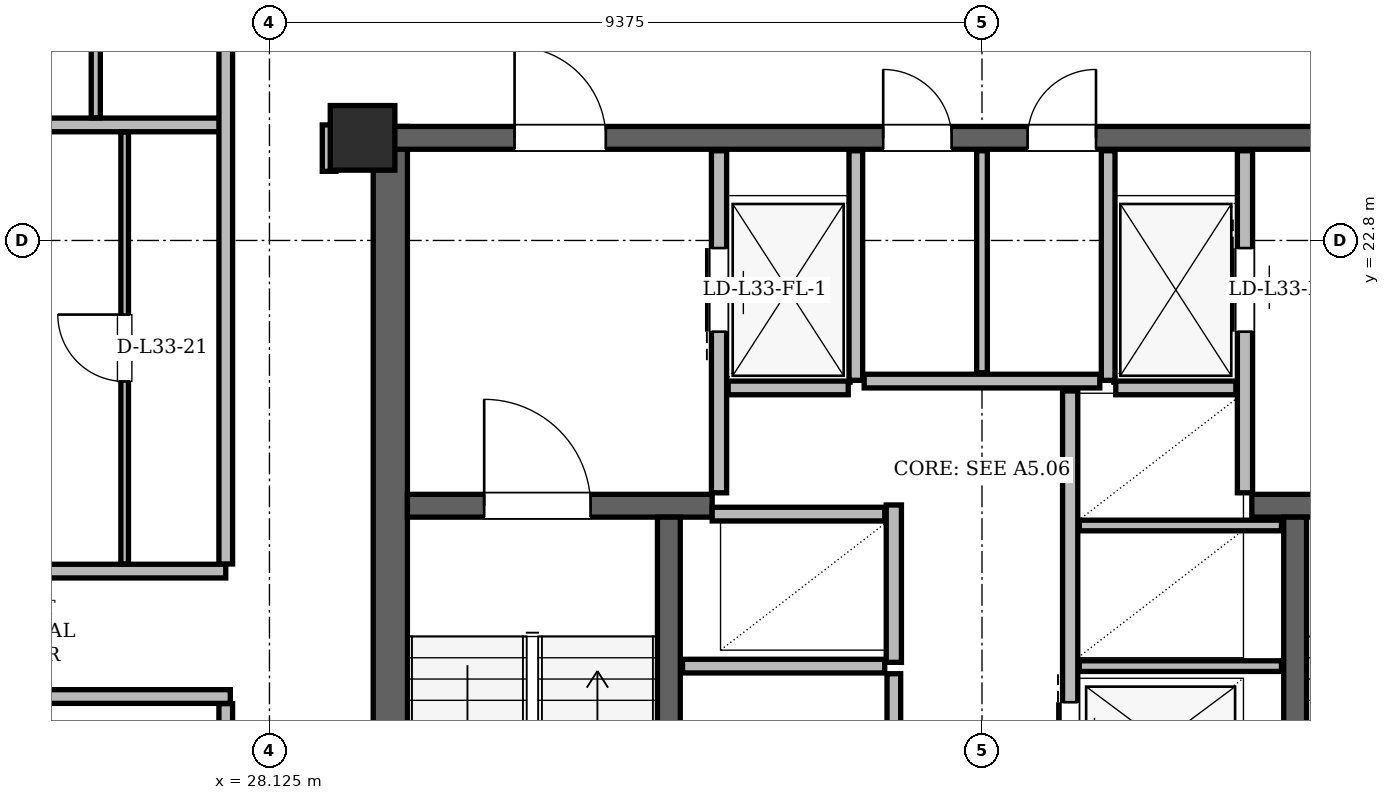
"""IFC4 building model, lengths in metres.
Left out: names, types, materials, properties, quantities, classifications, styles, units other than length and angle.
Written with IfcOpenShell. Run it as: python <this file> out.ifc"""

import sys

from ifc_helpers import new_model, si_unit, direction, frame, frame_2d, origin, origin_2d, place, context, subcontext, project, spatial, rectangle, hollow_rectangle, extrude, element, fill, save


model = new_model("IFC4")
c1 = context("Model", 3, precision=1e-05, world=origin(), true_north=direction((0.0, 1.0)))
c2 = subcontext(c1, "Body", "Model", "MODEL_VIEW")
j1 = project(units=[si_unit("LENGTHUNIT", "METRE"), si_unit("PLANEANGLEUNIT", "RADIAN")], contexts=[c1])
p1 = place(None, origin())
s1 = spatial("IfcSite", under=j1, at=p1, CompositionType="ELEMENT")
p2 = place(p1, origin())
s2 = spatial("IfcBuilding", under=s1, at=p2, CompositionType="ELEMENT")
p3 = place(p2, frame((0.0, 0.0, 126.6)))
s3 = spatial("IfcBuildingStorey", under=s2, at=p3, CompositionType="ELEMENT", Elevation=126.6)
p4 = place(p3, frame((29.35, 24.15, 0.0), z_axis=(0.0, 0.0, 1.0), x_axis=(1.0, 0.0, 0.0)))
e1 = element("IfcColumn", 1, at=p4, inside=s3, PredefinedType="COLUMN", context=c2, shape_type="SweptSolid", body=[
    extrude(hollow_rectangle(XDim=0.85, YDim=0.85, WallThickness=0.07, at=origin_2d()), origin(), (0.0, 0.0, 1.0), 3.6),
])
p5 = place(p3, frame((29.715, 11.0, 0.0), z_axis=(0.0, 0.0, 1.0), x_axis=(0.0, 1.0, 0.0)))
e2 = element("IfcWall", 2, at=p5, inside=s3, PredefinedType="SHEAR", context=c2, shape_type="SweptSolid", body=[
    extrude(rectangle(XDim=13.3, YDim=0.45, at=frame_2d((6.65, 0.0))), origin(), (0.0, 0.0, 1.0), 3.36),
])
p6 = place(p3, frame((29.65, 24.15, 0.0), z_axis=(0.0, 0.0, 1.0), x_axis=(1.0, 0.0, 0.0)))
e3 = element("IfcWall", 3, at=p6, inside=s3, PredefinedType="SHEAR", context=c2, shape_type="SweptSolid", body=[
    extrude(rectangle(XDim=15.7, YDim=0.3, at=frame_2d((7.85, 0.0))), origin(), (0.0, 0.0, 1.0), 3.36),
])
p7 = place(p6, frame((1.7, 0.0, 0.0)))
e4 = element("IfcOpeningElement", 4, at=p7, cuts=e3, PredefinedType="OPENING", context=c2, shape_type="SweptSolid", body=[
    extrude(rectangle(XDim=1.2, YDim=2.2, at=frame_2d((0.6, 1.1))), frame((0.0, 0.15, 0.0), z_axis=(0.0, -1.0, 0.0), x_axis=(1.0, 0.0, 0.0)), (0.0, 0.0, 1.0), 0.3),
])
p8 = place(p6, frame((12.8, 0.0, 0.0)))
e5 = element("IfcOpeningElement", 5, at=p8, cuts=e3, PredefinedType="OPENING", context=c2, shape_type="SweptSolid", body=[
    extrude(rectangle(XDim=1.2, YDim=2.2, at=frame_2d((0.6, 1.1))), frame((0.0, 0.15, 0.0), z_axis=(0.0, -1.0, 0.0), x_axis=(1.0, 0.0, 0.0)), (0.0, 0.0, 1.0), 0.3),
])
p9 = place(p6, frame((6.55, 0.0, 0.0)))
e6 = element("IfcOpeningElement", 6, at=p9, cuts=e3, PredefinedType="OPENING", context=c2, shape_type="SweptSolid", body=[
    extrude(rectangle(XDim=0.9, YDim=2.05, at=frame_2d((0.45, 1.025))), frame((0.0, 0.15, 0.0), z_axis=(0.0, -1.0, 0.0), x_axis=(1.0, 0.0, 0.0)), (0.0, 0.0, 1.0), 0.3),
])
p10 = place(p6, frame((8.45, 0.0, 0.0)))
e7 = element("IfcOpeningElement", 7, at=p10, cuts=e3, PredefinedType="OPENING", context=c2, shape_type="SweptSolid", body=[
    extrude(rectangle(XDim=0.9, YDim=2.05, at=frame_2d((0.45, 1.025))), frame((0.0, 0.15, 0.0), z_axis=(0.0, -1.0, 0.0), x_axis=(1.0, 0.0, 0.0)), (0.0, 0.0, 1.0), 0.3),
])
p11 = place(p3, frame((29.94, 19.31, 0.0), z_axis=(0.0, 0.0, 1.0), x_axis=(1.0, 0.0, 0.0)))
e8 = element("IfcWall", 8, at=p11, inside=s3, PredefinedType="SHEAR", context=c2, shape_type="SweptSolid", body=[
    extrude(rectangle(XDim=4.01, YDim=0.3, at=frame_2d((2.005, 0.0))), origin(), (0.0, 0.0, 1.0), 3.36),
])
p12 = place(p11, frame((1.01, 0.0, 0.0)))
e9 = element("IfcOpeningElement", 9, at=p12, cuts=e8, PredefinedType="OPENING", context=c2, shape_type="SweptSolid", body=[
    extrude(rectangle(XDim=1.4, YDim=2.2, at=frame_2d((0.7, 1.1))), frame((0.0, 0.15, 0.0), z_axis=(0.0, -1.0, 0.0), x_axis=(1.0, 0.0, 0.0)), (0.0, 0.0, 1.0), 0.3),
])
p13 = place(p3, frame((41.05, 19.31, 0.0), z_axis=(0.0, 0.0, 1.0), x_axis=(1.0, 0.0, 0.0)))
e10 = element("IfcWall", 10, at=p13, inside=s3, PredefinedType="SHEAR", context=c2, shape_type="SweptSolid", body=[
    extrude(rectangle(XDim=4.01, YDim=0.3, at=frame_2d((2.005, 0.0))), origin(), (0.0, 0.0, 1.0), 3.36),
])
p14 = place(p13, frame((1.6, 0.0, 0.0)))
e11 = element("IfcOpeningElement", 11, at=p14, cuts=e10, PredefinedType="OPENING", context=c2, shape_type="SweptSolid", body=[
    extrude(rectangle(XDim=1.4, YDim=2.2, at=frame_2d((0.7, 1.1))), frame((0.0, 0.15, 0.0), z_axis=(0.0, -1.0, 0.0), x_axis=(1.0, 0.0, 0.0)), (0.0, 0.0, 1.0), 0.3),
])
for number, where, z_axis, x_axis in (
    (12, (33.38, 11.54, 0.0), (0.0, 0.0, 1.0), (0.0, 1.0, 0.0)),
    (13, (41.62, 11.54, 0.0), (0.0, 0.0, 1.0), (0.0, 1.0, 0.0)),
):
    element("IfcWall", number, at=place(p3, frame(where, z_axis=z_axis, x_axis=x_axis)), inside=s3, PredefinedType="SHEAR", context=c2, shape_type="SweptSolid", body=[
        extrude(rectangle(XDim=7.62, YDim=0.3, at=frame_2d((3.81, 0.0))), origin(), (0.0, 0.0, 1.0), 3.36),
    ])
p15 = place(p3, frame((32.214, 43.387, 0.0), z_axis=(0.0, 0.0, 1.0), x_axis=(-0.499998814518, -0.866026088222, 0.0)))
e14 = element("IfcWall", 14, at=p15, inside=s3, PredefinedType="SOLIDWALL", context=c2, shape_type="SweptSolid", body=[
    extrude(rectangle(XDim=35.049, YDim=0.34, at=frame_2d((17.524, 0.0))), origin(), (0.0, 0.0, 1.0), 2.578),
])
p16 = place(p15, frame((8.034, 0.0, 0.0)))
e15 = element("IfcOpeningElement", 15, at=p16, cuts=e14, PredefinedType="OPENING", context=c2, shape_type="SweptSolid", body=[
    extrude(rectangle(XDim=1.5, YDim=2.2, at=frame_2d((0.75, 1.1))), frame((0.0, 0.17, 0.0), z_axis=(0.0, -1.0, 0.0), x_axis=(1.0, 0.0, 0.0)), (0.0, 0.0, 1.0), 0.34),
])
p17 = place(p15, frame((26.97, 0.0, 0.0)))
e16 = element("IfcOpeningElement", 16, at=p17, cuts=e14, PredefinedType="OPENING", context=c2, shape_type="SweptSolid", body=[
    extrude(rectangle(XDim=1.5, YDim=2.2, at=frame_2d((0.75, 1.1))), frame((0.0, 0.17, 0.0), z_axis=(0.0, -1.0, 0.0), x_axis=(1.0, 0.0, 0.0)), (0.0, 0.0, 1.0), 0.34),
])
p18 = place(p15, frame((32.614, 0.0, 0.85)))
e17 = element("IfcOpeningElement", 17, at=p18, cuts=e14, PredefinedType="OPENING", context=c2, shape_type="SweptSolid", body=[
    extrude(rectangle(XDim=1.4, YDim=1.6, at=frame_2d((0.7, 0.8))), frame((0.0, 0.17, 0.0), z_axis=(0.0, -1.0, 0.0), x_axis=(1.0, 0.0, 0.0)), (0.0, 0.0, 1.0), 0.34),
])
p19 = place(p15, frame((22.603, 0.0, 0.85)))
e18 = element("IfcOpeningElement", 18, at=p19, cuts=e14, PredefinedType="OPENING", context=c2, shape_type="SweptSolid", body=[
    extrude(rectangle(XDim=1.2, YDim=1.48, at=frame_2d((0.6, 0.74))), frame((0.0, 0.17, 0.0), z_axis=(0.0, -1.0, 0.0), x_axis=(1.0, 0.0, 0.0)), (0.0, 0.0, 1.0), 0.34),
])
p20 = place(p15, frame((2.414, 0.0, 0.85)))
e19 = element("IfcOpeningElement", 19, at=p20, cuts=e14, PredefinedType="OPENING", context=c2, shape_type="SweptSolid", body=[
    extrude(rectangle(XDim=1.4, YDim=1.6, at=frame_2d((0.7, 0.8))), frame((0.0, 0.17, 0.0), z_axis=(0.0, -1.0, 0.0), x_axis=(1.0, 0.0, 0.0)), (0.0, 0.0, 1.0), 0.34),
])
p21 = place(p15, frame((13.484, 0.0, 0.85)))
e20 = element("IfcOpeningElement", 20, at=p21, cuts=e14, PredefinedType="OPENING", context=c2, shape_type="SweptSolid", body=[
    extrude(rectangle(XDim=2.5, YDim=1.618, at=frame_2d((1.25, 0.809))), frame((0.0, 0.17, 0.0), z_axis=(0.0, -1.0, 0.0), x_axis=(1.0, 0.0, 0.0)), (0.0, 0.0, 1.0), 0.34),
])
p22 = place(p15, frame((18.27, 0.0, 0.85)))
e21 = element("IfcOpeningElement", 21, at=p22, cuts=e14, PredefinedType="OPENING", context=c2, shape_type="SweptSolid", body=[
    extrude(rectangle(XDim=1.2, YDim=1.48, at=frame_2d((0.6, 0.74))), frame((0.0, 0.17, 0.0), z_axis=(0.0, -1.0, 0.0), x_axis=(1.0, 0.0, 0.0)), (0.0, 0.0, 1.0), 0.34),
])
p23 = place(p15, frame((20.466, 0.0, 0.85)))
e22 = element("IfcOpeningElement", 22, at=p23, cuts=e14, PredefinedType="OPENING", context=c2, shape_type="SweptSolid", body=[
    extrude(rectangle(XDim=1.2, YDim=1.48, at=frame_2d((0.6, 0.74))), frame((0.0, 0.17, 0.0), z_axis=(0.0, -1.0, 0.0), x_axis=(1.0, 0.0, 0.0)), (0.0, 0.0, 1.0), 0.34),
])
p24 = place(p3, frame((34.04, 19.48, 0.0), z_axis=(0.0, 0.0, 1.0), x_axis=(0.0, 1.0, 0.0)))
e23 = element("IfcWall", 23, at=p24, inside=s3, PredefinedType="PARTITIONING", context=c2, shape_type="SweptSolid", body=[
    extrude(rectangle(XDim=4.5, YDim=0.2, at=frame_2d((2.25, 0.0))), origin(), (0.0, 0.0, 1.0), 2.4),
])
p25 = place(p24, frame((2.12, 0.0, 0.0)))
e24 = element("IfcOpeningElement", 24, at=p25, cuts=e23, PredefinedType="OPENING", context=c2, shape_type="SweptSolid", body=[
    extrude(rectangle(XDim=1.1, YDim=2.2, at=frame_2d((0.55, 1.1))), frame((0.0, 0.1, 0.0), z_axis=(0.0, -1.0, 0.0), x_axis=(1.0, 0.0, 0.0)), (0.0, 0.0, 1.0), 0.2),
])
p26 = place(p3, frame((35.84, 20.96, 0.0), z_axis=(0.0, 0.0, 1.0), x_axis=(0.0, 1.0, 0.0)))
e25 = element("IfcWall", 25, at=p26, inside=s3, PredefinedType="PARTITIONING", context=c2, shape_type="SweptSolid", body=[
    extrude(rectangle(XDim=3.02, YDim=0.18, at=frame_2d((1.51, 0.0))), origin(), (0.0, 0.0, 1.0), 2.4),
])
p27 = place(p3, frame((34.16, 20.86, 0.0), z_axis=(0.0, 0.0, 1.0), x_axis=(1.0, 0.0, 0.0)))
e26 = element("IfcWall", 26, at=p27, inside=s3, PredefinedType="PARTITIONING", context=c2, shape_type="SweptSolid", body=[
    extrude(rectangle(XDim=1.58, YDim=0.18, at=frame_2d((0.79, 0.0))), origin(), (0.0, 0.0, 1.0), 3.36),
])
p28 = place(p3, frame((40.96, 19.48, 0.0), z_axis=(0.0, 0.0, 1.0), x_axis=(0.0, 1.0, 0.0)))
e27 = element("IfcWall", 27, at=p28, inside=s3, PredefinedType="PARTITIONING", context=c2, shape_type="SweptSolid", body=[
    extrude(rectangle(XDim=4.5, YDim=0.2, at=frame_2d((2.25, 0.0))), origin(), (0.0, 0.0, 1.0), 2.4),
])
p29 = place(p28, frame((2.12, 0.0, 0.0)))
e28 = element("IfcOpeningElement", 28, at=p29, cuts=e27, PredefinedType="OPENING", context=c2, shape_type="SweptSolid", body=[
    extrude(rectangle(XDim=1.1, YDim=2.2, at=frame_2d((0.55, 1.1))), frame((0.0, 0.1, 0.0), z_axis=(0.0, -1.0, 0.0), x_axis=(1.0, 0.0, 0.0)), (0.0, 0.0, 1.0), 0.2),
])
p30 = place(p3, frame((39.16, 20.96, 0.0), z_axis=(0.0, 0.0, 1.0), x_axis=(0.0, 1.0, 0.0)))
e29 = element("IfcWall", 29, at=p30, inside=s3, PredefinedType="PARTITIONING", context=c2, shape_type="SweptSolid", body=[
    extrude(rectangle(XDim=3.02, YDim=0.18, at=frame_2d((1.51, 0.0))), origin(), (0.0, 0.0, 1.0), 2.4),
])
p31 = place(p3, frame((39.26, 20.86, 0.0), z_axis=(0.0, 0.0, 1.0), x_axis=(1.0, 0.0, 0.0)))
e30 = element("IfcWall", 30, at=p31, inside=s3, PredefinedType="PARTITIONING", context=c2, shape_type="SweptSolid", body=[
    extrude(rectangle(XDim=1.58, YDim=0.18, at=frame_2d((0.79, 0.0))), origin(), (0.0, 0.0, 1.0), 3.36),
])
p32 = place(p3, frame((36.34, 17.25, 0.0), z_axis=(0.0, 0.0, 1.0), x_axis=(0.0, 1.0, 0.0)))
e31 = element("IfcWall", 31, at=p32, inside=s3, PredefinedType="PARTITIONING", context=c2, shape_type="SweptSolid", body=[
    extrude(rectangle(XDim=2.07, YDim=0.2, at=frame_2d((1.035, 0.0))), origin(), (0.0, 0.0, 1.0), 3.36),
])
p33 = place(p3, frame((33.95, 19.2, 0.0), z_axis=(0.0, 0.0, 1.0), x_axis=(1.0, 0.0, 0.0)))
e32 = element("IfcWall", 32, at=p33, inside=s3, PredefinedType="PARTITIONING", context=c2, shape_type="SweptSolid", body=[
    extrude(rectangle(XDim=2.27, YDim=0.18, at=frame_2d((1.135, 0.0))), origin(), (0.0, 0.0, 1.0), 3.36),
])
p34 = place(p3, frame((33.56, 17.2, 0.0), z_axis=(0.0, 0.0, 1.0), x_axis=(1.0, 0.0, 0.0)))
e33 = element("IfcWall", 33, at=p34, inside=s3, PredefinedType="PARTITIONING", context=c2, shape_type="SweptSolid", body=[
    extrude(rectangle(XDim=2.66, YDim=0.18, at=frame_2d((1.33, 0.0))), origin(), (0.0, 0.0, 1.0), 3.36),
])
p35 = place(p3, frame((36.34, 11.55, 0.0), z_axis=(0.0, 0.0, 1.0), x_axis=(0.0, 1.0, 0.0)))
e34 = element("IfcWall", 34, at=p35, inside=s3, PredefinedType="PARTITIONING", context=c2, shape_type="SweptSolid", body=[
    extrude(rectangle(XDim=5.55, YDim=0.18, at=frame_2d((2.775, 0.0))), origin(), (0.0, 0.0, 1.0), 3.36),
])
p36 = place(p35, frame((2.85, 0.0, 0.0)))
e35 = element("IfcOpeningElement", 35, at=p36, cuts=e34, PredefinedType="OPENING", context=c2, shape_type="SweptSolid", body=[
    extrude(rectangle(XDim=0.95, YDim=2.1, at=frame_2d((0.475, 1.05))), frame((0.0, 0.09, 0.0), z_axis=(0.0, -1.0, 0.0), x_axis=(1.0, 0.0, 0.0)), (0.0, 0.0, 1.0), 0.18),
])
p37 = place(p3, frame((38.66, 11.72, 0.0), z_axis=(0.0, 0.0, 1.0), x_axis=(0.0, 1.0, 0.0)))
e36 = element("IfcWall", 36, at=p37, inside=s3, PredefinedType="PARTITIONING", context=c2, shape_type="SweptSolid", body=[
    extrude(rectangle(XDim=9.1, YDim=0.2, at=frame_2d((4.55, 0.0))), origin(), (0.0, 0.0, 1.0), 3.36),
])
p38 = place(p37, frame((0.255, 0.0, 0.0)))
e37 = element("IfcOpeningElement", 37, at=p38, cuts=e36, PredefinedType="OPENING", context=c2, shape_type="SweptSolid", body=[
    extrude(rectangle(XDim=1.05, YDim=2.15, at=frame_2d((0.525, 1.075))), frame((0.0, 0.1, 0.0), z_axis=(0.0, -1.0, 0.0), x_axis=(1.0, 0.0, 0.0)), (0.0, 0.0, 1.0), 0.2),
])
p39 = place(p37, frame((2.105, 0.0, 0.0)))
e38 = element("IfcOpeningElement", 38, at=p39, cuts=e36, PredefinedType="OPENING", context=c2, shape_type="SweptSolid", body=[
    extrude(rectangle(XDim=1.05, YDim=2.15, at=frame_2d((0.525, 1.075))), frame((0.0, 0.1, 0.0), z_axis=(0.0, -1.0, 0.0), x_axis=(1.0, 0.0, 0.0)), (0.0, 0.0, 1.0), 0.2),
])
p40 = place(p37, frame((3.955, 0.0, 0.0)))
e39 = element("IfcOpeningElement", 39, at=p40, cuts=e36, PredefinedType="OPENING", context=c2, shape_type="SweptSolid", body=[
    extrude(rectangle(XDim=1.05, YDim=2.15, at=frame_2d((0.525, 1.075))), frame((0.0, 0.1, 0.0), z_axis=(0.0, -1.0, 0.0), x_axis=(1.0, 0.0, 0.0)), (0.0, 0.0, 1.0), 0.2),
])
for number, where, z_axis, x_axis in (
    (40, (38.78, 17.2, 0.0), (0.0, 0.0, 1.0), (1.0, 0.0, 0.0)),
    (41, (38.78, 19.05, 0.0), (0.0, 0.0, 1.0), (1.0, 0.0, 0.0)),
):
    element("IfcWall", number, at=place(p3, frame(where, z_axis=z_axis, x_axis=x_axis)), inside=s3, PredefinedType="PARTITIONING", context=c2, shape_type="SweptSolid", body=[
        extrude(rectangle(XDim=2.66, YDim=0.14, at=frame_2d((1.33, 0.0))), origin(), (0.0, 0.0, 1.0), 3.36),
    ])
p41 = place(p3, frame((35.95, 20.95, 0.0), z_axis=(0.0, 0.0, 1.0), x_axis=(1.0, 0.0, 0.0)))
e42 = element("IfcWall", 42, at=p41, inside=s3, PredefinedType="PARTITIONING", context=c2, shape_type="SweptSolid", body=[
    extrude(rectangle(XDim=3.1, YDim=0.18, at=frame_2d((1.55, 0.0))), origin(), (0.0, 0.0, 1.0), 3.36),
])
p42 = place(p3, frame((37.5, 21.06, 0.0), z_axis=(0.0, 0.0, 1.0), x_axis=(0.0, 1.0, 0.0)))
e43 = element("IfcWall", 43, at=p42, inside=s3, PredefinedType="PARTITIONING", context=c2, shape_type="SweptSolid", body=[
    extrude(rectangle(XDim=2.92, YDim=0.14, at=frame_2d((1.46, 0.0))), origin(), (0.0, 0.0, 1.0), 2.4),
])
p43 = place(p3, frame((17.065, 16.8, 0.0), z_axis=(0.0, 0.0, 1.0), x_axis=(1.0, 0.0, 0.0)))
e44 = element("IfcWall", 44, at=p43, inside=s3, PredefinedType="PARTITIONING", context=c2, shape_type="SweptSolid", body=[
    extrude(rectangle(XDim=10.545, YDim=0.18, at=frame_2d((5.273, 0.0))), origin(), (0.0, 0.0, 1.0), 3.36),
])
p44 = place(p3, frame((18.017, 18.45, 0.0), z_axis=(0.0, 0.0, 1.0), x_axis=(1.0, 0.0, 0.0)))
e45 = element("IfcWall", 45, at=p44, inside=s3, PredefinedType="PARTITIONING", context=c2, shape_type="SweptSolid", body=[
    extrude(rectangle(XDim=9.533, YDim=0.18, at=frame_2d((4.767, 0.0))), origin(), (0.0, 0.0, 1.0), 3.36),
])
p45 = place(p44, frame((2.791, 0.0, 0.0)))
e46 = element("IfcOpeningElement", 46, at=p45, cuts=e45, PredefinedType="OPENING", context=c2, shape_type="SweptSolid", body=[
    extrude(rectangle(XDim=1.0, YDim=2.18, at=frame_2d((0.5, 1.09))), frame((0.0, 0.09, 0.0), z_axis=(0.0, -1.0, 0.0), x_axis=(1.0, 0.0, 0.0)), (0.0, 0.0, 1.0), 0.18),
])
p46 = place(p3, frame((21.406, 24.32, 0.0), z_axis=(0.0, 0.0, 1.0), x_axis=(1.0, 0.0, 0.0)))
e47 = element("IfcWall", 47, at=p46, inside=s3, PredefinedType="PARTITIONING", context=c2, shape_type="SweptSolid", body=[
    extrude(rectangle(XDim=6.204, YDim=0.18, at=frame_2d((3.102, 0.0))), origin(), (0.0, 0.0, 1.0), 3.36),
])
p47 = place(p3, frame((25.84, 24.414, 0.0), z_axis=(0.0, 0.0, 1.0), x_axis=(0.0, 1.0, 0.0)))
e48 = element("IfcWall", 48, at=p47, inside=s3, PredefinedType="PARTITIONING", context=c2, shape_type="SweptSolid", body=[
    extrude(rectangle(XDim=3.192, YDim=0.12, at=frame_2d((1.596, 0.0))), origin(), (0.0, 0.0, 1.0), 3.36),
])
p48 = place(p3, frame((26.22, 18.544, 0.0), z_axis=(0.0, 0.0, 1.0), x_axis=(0.0, 1.0, 0.0)))
e49 = element("IfcWall", 49, at=p48, inside=s3, PredefinedType="PARTITIONING", context=c2, shape_type="SweptSolid", body=[
    extrude(rectangle(XDim=5.682, YDim=0.1, at=frame_2d((2.841, 0.0))), origin(), (0.0, 0.0, 1.0), 3.36),
])
p49 = place(p48, frame((2.401, 0.0, 0.0)))
e50 = element("IfcOpeningElement", 50, at=p49, cuts=e49, PredefinedType="OPENING", context=c2, shape_type="SweptSolid", body=[
    extrude(rectangle(XDim=0.88, YDim=2.08, at=frame_2d((0.44, 1.04))), frame((0.0, 0.05, 0.0), z_axis=(0.0, -1.0, 0.0), x_axis=(1.0, 0.0, 0.0)), (0.0, 0.0, 1.0), 0.1),
])
p50 = place(p3, frame((27.55, 11.044, 0.0), z_axis=(0.0, 0.0, 1.0), x_axis=(0.0, 1.0, 0.0)))
e51 = element("IfcWall", 51, at=p50, inside=s3, PredefinedType="PARTITIONING", context=c2, shape_type="SweptSolid", body=[
    extrude(rectangle(XDim=5.662, YDim=0.18, at=frame_2d((2.831, 0.0))), origin(), (0.0, 0.0, 1.0), 2.814),
])
p51 = place(p3, frame((27.55, 18.544, 0.0), z_axis=(0.0, 0.0, 1.0), x_axis=(0.0, 1.0, 0.0)))
e52 = element("IfcWall", 52, at=p51, inside=s3, PredefinedType="PARTITIONING", context=c2, shape_type="SweptSolid", body=[
    extrude(rectangle(XDim=7.332, YDim=0.18, at=frame_2d((3.666, 0.0))), origin(), (0.0, 0.0, 1.0), 3.36),
])
p52 = place(p3, frame((28.91, 23.71, 0.0), z_axis=(0.0, 0.0, 1.0), x_axis=(0.0, 1.0, 0.0)))
e53 = element("IfcWall", 53, at=p52, inside=s3, PredefinedType="PARTITIONING", context=c2, shape_type="SweptSolid", body=[
    extrude(rectangle(XDim=0.61, YDim=0.18, at=frame_2d((0.305, 0.0))), origin(), (0.0, 0.0, 1.0), 3.36),
])
p53 = place(p25, origin())
e54 = element("IfcDoor", 54, at=p53, inside=s3, OperationType="SLIDING_TO_LEFT", PredefinedType="DOOR", context=c2, shape_type="SweptSolid", body=[
    extrude(rectangle(XDim=1.1, YDim=2.2, at=frame_2d((0.55, 1.1))), frame((0.0, 0.025, 0.0), z_axis=(0.0, -1.0, 0.0), x_axis=(1.0, 0.0, 0.0)), (0.0, 0.0, 1.0), 0.05),
])
fill(e24, e54)
p54 = place(p29, origin())
e55 = element("IfcDoor", 55, at=p54, inside=s3, OperationType="SLIDING_TO_RIGHT", PredefinedType="DOOR", context=c2, shape_type="SweptSolid", body=[
    extrude(rectangle(XDim=1.1, YDim=2.2, at=frame_2d((0.55, 1.1))), frame((0.0, 0.025, 0.0), z_axis=(0.0, -1.0, 0.0), x_axis=(1.0, 0.0, 0.0)), (0.0, 0.0, 1.0), 0.05),
])
fill(e28, e55)
p55 = place(p40, origin())
e56 = element("IfcDoor", 56, at=p55, inside=s3, OperationType="SLIDING_TO_RIGHT", PredefinedType="DOOR", context=c2, shape_type="SweptSolid", body=[
    extrude(rectangle(XDim=1.05, YDim=2.15, at=frame_2d((0.525, 1.075))), frame((0.0, 0.025, 0.0), z_axis=(0.0, -1.0, 0.0), x_axis=(1.0, 0.0, 0.0)), (0.0, 0.0, 1.0), 0.05),
])
fill(e39, e56)
p56 = place(p12, origin())
e57 = element("IfcDoor", 57, at=p56, inside=s3, OperationType="SINGLE_SWING_LEFT", PredefinedType="DOOR", context=c2, shape_type="SweptSolid", body=[
    extrude(rectangle(XDim=1.4, YDim=2.2, at=frame_2d((0.7, 1.1))), frame((0.0, 0.025, 0.0), z_axis=(0.0, -1.0, 0.0), x_axis=(1.0, 0.0, 0.0)), (0.0, 0.0, 1.0), 0.05),
])
fill(e9, e57)
p57 = place(p7, origin())
e58 = element("IfcDoor", 58, at=p57, inside=s3, OperationType="SINGLE_SWING_LEFT", PredefinedType="DOOR", context=c2, shape_type="SweptSolid", body=[
    extrude(rectangle(XDim=1.2, YDim=2.2, at=frame_2d((0.6, 1.1))), frame((0.0, 0.025, 0.0), z_axis=(0.0, -1.0, 0.0), x_axis=(1.0, 0.0, 0.0)), (0.0, 0.0, 1.0), 0.05),
])
fill(e4, e58)
p58 = place(p9, origin())
e59 = element("IfcDoor", 59, at=p58, inside=s3, OperationType="SINGLE_SWING_LEFT", PredefinedType="DOOR", context=c2, shape_type="SweptSolid", body=[
    extrude(rectangle(XDim=0.9, YDim=2.05, at=frame_2d((0.45, 1.025))), frame((0.0, 0.025, 0.0), z_axis=(0.0, -1.0, 0.0), x_axis=(1.0, 0.0, 0.0)), (0.0, 0.0, 1.0), 0.05),
])
fill(e6, e59)
p59 = place(p10, origin())
e60 = element("IfcDoor", 60, at=p59, inside=s3, OperationType="SINGLE_SWING_RIGHT", PredefinedType="DOOR", context=c2, shape_type="SweptSolid", body=[
    extrude(rectangle(XDim=0.9, YDim=2.05, at=frame_2d((0.45, 1.025))), frame((0.0, 0.025, 0.0), z_axis=(0.0, -1.0, 0.0), x_axis=(1.0, 0.0, 0.0)), (0.0, 0.0, 1.0), 0.05),
])
fill(e7, e60)
p60 = place(p49, origin())
e61 = element("IfcDoor", 61, at=p60, inside=s3, OperationType="SINGLE_SWING_RIGHT", PredefinedType="DOOR", context=c2, shape_type="SweptSolid", body=[
    extrude(rectangle(XDim=0.88, YDim=2.08, at=frame_2d((0.44, 1.04))), frame((0.0, 0.025, 0.0), z_axis=(0.0, -1.0, 0.0), x_axis=(1.0, 0.0, 0.0)), (0.0, 0.0, 1.0), 0.05),
])
fill(e50, e61)
save(model, sys.argv[1])
